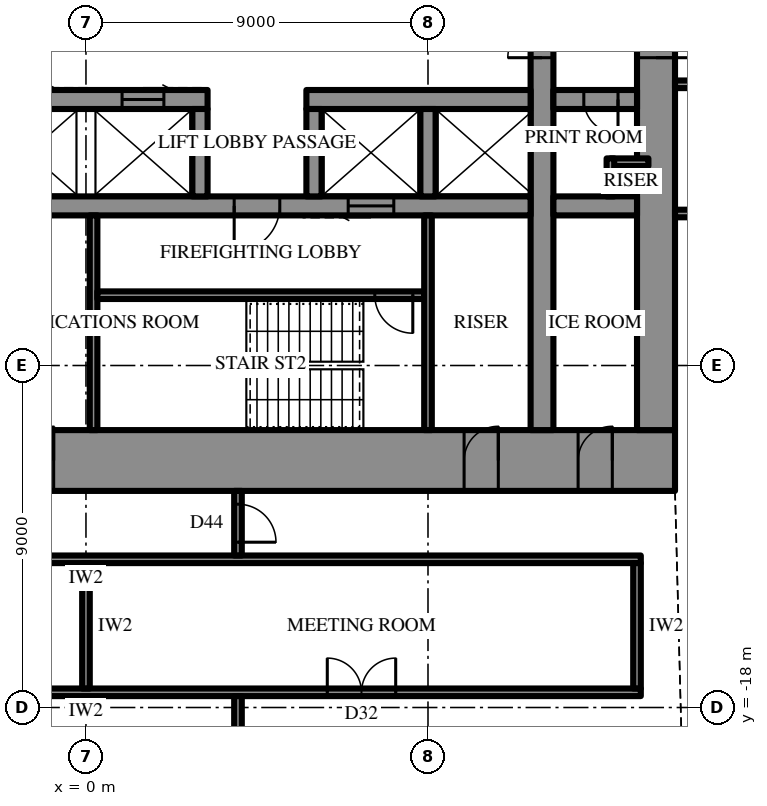
"""IFC4 building model, lengths in metres.
Left out: names, types, materials, properties, quantities, classifications, styles, units other than length and angle.
Written with IfcOpenShell. Run it as: python <this file> out.ifc"""

import sys

from ifc_helpers import new_model, si_unit, direction, frame, frame_2d, origin, place, context, subcontext, project, spatial, rectangle, extrude, element, fill, save


model = new_model("IFC4")
c1 = context("Model", 3, precision=1e-05, world=origin(), true_north=direction((0.0, 1.0)))
c2 = subcontext(c1, "Body", "Model", "MODEL_VIEW")
j1 = project(units=[si_unit("LENGTHUNIT", "METRE"), si_unit("PLANEANGLEUNIT", "RADIAN")], contexts=[c1])
p1 = place(None, origin())
s1 = spatial("IfcSite", under=j1, at=p1, CompositionType="ELEMENT")
p2 = place(p1, origin())
s2 = spatial("IfcBuilding", under=s1, at=p2, CompositionType="ELEMENT")
p3 = place(p2, frame((0.0, 0.0, 282.7)))
s3 = spatial("IfcBuildingStorey", under=s2, at=p3, CompositionType="ELEMENT", Elevation=282.7)
p4 = place(p3, frame((15.5, -11.5, 0.0), z_axis=(0.0, 0.0, 1.0), x_axis=(-1.0, 0.0, 0.0)))
e1 = element("IfcWall", 1, at=p4, inside=s3, PredefinedType="SHEAR", context=c2, shape_type="SweptSolid", body=[
    extrude(rectangle(XDim=31.0, YDim=1.6, at=frame_2d((15.5, 0.0))), origin(), (0.0, 0.0, 1.0), 4.2),
])
p5 = place(p4, frame((16.35, 0.0, 0.0)))
e2 = element("IfcOpeningElement", 2, at=p5, cuts=e1, PredefinedType="OPENING", context=c2, shape_type="SweptSolid", body=[
    extrude(rectangle(XDim=0.9, YDim=2.2, at=frame_2d((0.45, 1.1))), frame((0.0, 0.81, 0.0), z_axis=(0.0, -1.0, 0.0), x_axis=(1.0, 0.0, 0.0)), (0.0, 0.0, 1.0), 1.62),
])
p6 = place(p4, frame((19.35, 0.0, 0.0)))
e3 = element("IfcOpeningElement", 3, at=p6, cuts=e1, PredefinedType="OPENING", context=c2, shape_type="SweptSolid", body=[
    extrude(rectangle(XDim=0.9, YDim=2.2, at=frame_2d((0.45, 1.1))), frame((0.0, 0.81, 0.0), z_axis=(0.0, -1.0, 0.0), x_axis=(1.0, 0.0, 0.0)), (0.0, 0.0, 1.0), 1.62),
])
p7 = place(p4, frame((22.4, 0.0, 0.0)))
e4 = element("IfcOpeningElement", 4, at=p7, cuts=e1, PredefinedType="OPENING", context=c2, shape_type="SweptSolid", body=[
    extrude(rectangle(XDim=1.0, YDim=2.2, at=frame_2d((0.5, 1.1))), frame((0.0, 0.81, 0.0), z_axis=(0.0, -1.0, 0.0), x_axis=(1.0, 0.0, 0.0)), (0.0, 0.0, 1.0), 1.62),
])
p8 = place(p4, frame((1.65, 0.0, 0.0)))
e5 = element("IfcOpeningElement", 5, at=p8, cuts=e1, PredefinedType="OPENING", context=c2, shape_type="SweptSolid", body=[
    extrude(rectangle(XDim=0.9, YDim=2.2, at=frame_2d((0.45, 1.1))), frame((0.0, 0.81, 0.0), z_axis=(0.0, -1.0, 0.0), x_axis=(1.0, 0.0, 0.0)), (0.0, 0.0, 1.0), 1.62),
])
p9 = place(p4, frame((4.65, 0.0, 0.0)))
e6 = element("IfcOpeningElement", 6, at=p9, cuts=e1, PredefinedType="OPENING", context=c2, shape_type="SweptSolid", body=[
    extrude(rectangle(XDim=0.9, YDim=2.2, at=frame_2d((0.45, 1.1))), frame((0.0, 0.81, 0.0), z_axis=(0.0, -1.0, 0.0), x_axis=(1.0, 0.0, 0.0)), (0.0, 0.0, 1.0), 1.62),
])
p10 = place(p4, frame((25.45, 0.0, 0.0)))
e7 = element("IfcOpeningElement", 7, at=p10, cuts=e1, PredefinedType="OPENING", context=c2, shape_type="SweptSolid", body=[
    extrude(rectangle(XDim=0.9, YDim=2.2, at=frame_2d((0.45, 1.1))), frame((0.0, 0.81, 0.0), z_axis=(0.0, -1.0, 0.0), x_axis=(1.0, 0.0, 0.0)), (0.0, 0.0, 1.0), 1.62),
])
p11 = place(p4, frame((28.45, 0.0, 0.0)))
e8 = element("IfcOpeningElement", 8, at=p11, cuts=e1, PredefinedType="OPENING", context=c2, shape_type="SweptSolid", body=[
    extrude(rectangle(XDim=0.9, YDim=2.2, at=frame_2d((0.45, 1.1))), frame((0.0, 0.81, 0.0), z_axis=(0.0, -1.0, 0.0), x_axis=(1.0, 0.0, 0.0)), (0.0, 0.0, 1.0), 1.62),
])
p12 = place(p3, frame((15.0, -10.7, 0.0), z_axis=(0.0, 0.0, 1.0), x_axis=(0.0, 1.0, 0.0)))
e9 = element("IfcWall", 9, at=p12, inside=s3, PredefinedType="SHEAR", context=c2, shape_type="SweptSolid", body=[
    extrude(rectangle(XDim=21.4, YDim=1.0, at=frame_2d((10.7, 0.0))), origin(), (0.0, 0.0, 1.0), 4.2),
])
p13 = place(p12, frame((9.8, 0.0, 0.0)))
e10 = element("IfcOpeningElement", 10, at=p13, cuts=e9, PredefinedType="OPENING", context=c2, shape_type="SweptSolid", body=[
    extrude(rectangle(XDim=1.8, YDim=2.4, at=frame_2d((0.9, 1.2))), frame((0.0, 0.51, 0.0), z_axis=(0.0, -1.0, 0.0), x_axis=(1.0, 0.0, 0.0)), (0.0, 0.0, 1.0), 1.02),
])
p14 = place(p3, frame((12.0, -10.7, 0.0), z_axis=(0.0, 0.0, 1.0), x_axis=(0.0, 1.0, 0.0)))
e11 = element("IfcWall", 11, at=p14, inside=s3, PredefinedType="SHEAR", context=c2, shape_type="SweptSolid", body=[
    extrude(rectangle(XDim=21.4, YDim=0.6, at=frame_2d((10.7, 0.0))), origin(), (0.0, 0.0, 1.0), 4.2),
])
p15 = place(p14, frame((9.8, 0.0, 0.0)))
e12 = element("IfcOpeningElement", 12, at=p15, cuts=e11, PredefinedType="OPENING", context=c2, shape_type="SweptSolid", body=[
    extrude(rectangle(XDim=1.8, YDim=2.4, at=frame_2d((0.9, 1.2))), frame((0.0, 0.31, 0.0), z_axis=(0.0, -1.0, 0.0), x_axis=(1.0, 0.0, 0.0)), (0.0, 0.0, 1.0), 0.62),
])
p16 = place(p3, frame((14.5, -2.0, 0.0), z_axis=(0.0, 0.0, 1.0), x_axis=(-1.0, 0.0, 0.0)))
e13 = element("IfcWall", 13, at=p16, inside=s3, PredefinedType="SHEAR", context=c2, shape_type="SweptSolid", body=[
    extrude(rectangle(XDim=2.2, YDim=0.5, at=frame_2d((1.1, 0.0))), origin(), (0.0, 0.0, 1.0), 4.2),
])
p17 = place(p16, frame((0.5, 0.0, 0.0)))
e14 = element("IfcOpeningElement", 14, at=p17, cuts=e13, PredefinedType="OPENING", context=c2, shape_type="SweptSolid", body=[
    extrude(rectangle(XDim=0.9, YDim=2.2, at=frame_2d((0.45, 1.1))), frame((0.0, 0.26, 0.0), z_axis=(0.0, -1.0, 0.0), x_axis=(1.0, 0.0, 0.0)), (0.0, 0.0, 1.0), 0.52),
])
p18 = place(p3, frame((11.7, -2.0, 0.0), z_axis=(0.0, 0.0, 1.0), x_axis=(-1.0, 0.0, 0.0)))
e15 = element("IfcWall", 15, at=p18, inside=s3, PredefinedType="SHEAR", context=c2, shape_type="SweptSolid", body=[
    extrude(rectangle(XDim=5.9, YDim=0.5, at=frame_2d((2.95, 0.0))), origin(), (0.0, 0.0, 1.0), 4.2),
])
p19 = place(p3, frame((3.2, -2.0, 0.0), z_axis=(0.0, 0.0, 1.0), x_axis=(-1.0, 0.0, 0.0)))
e16 = element("IfcWall", 16, at=p19, inside=s3, PredefinedType="SHEAR", context=c2, shape_type="SweptSolid", body=[
    extrude(rectangle(XDim=14.9, YDim=0.5, at=frame_2d((7.45, 0.0))), origin(), (0.0, 0.0, 1.0), 4.2),
])
p20 = place(p19, frame((1.15, 0.0, 0.0)))
e17 = element("IfcOpeningElement", 17, at=p20, cuts=e16, PredefinedType="OPENING", context=c2, shape_type="SweptSolid", body=[
    extrude(rectangle(XDim=1.1, YDim=2.2, at=frame_2d((0.55, 1.1))), frame((0.0, 0.26, 0.0), z_axis=(0.0, -1.0, 0.0), x_axis=(1.0, 0.0, 0.0)), (0.0, 0.0, 1.0), 0.52),
])
p21 = place(p19, frame((4.15, 0.0, 0.0)))
e18 = element("IfcOpeningElement", 18, at=p21, cuts=e16, PredefinedType="OPENING", context=c2, shape_type="SweptSolid", body=[
    extrude(rectangle(XDim=1.1, YDim=2.2, at=frame_2d((0.55, 1.1))), frame((0.0, 0.26, 0.0), z_axis=(0.0, -1.0, 0.0), x_axis=(1.0, 0.0, 0.0)), (0.0, 0.0, 1.0), 0.52),
])
p22 = place(p19, frame((7.15, 0.0, 0.0)))
e19 = element("IfcOpeningElement", 19, at=p22, cuts=e16, PredefinedType="OPENING", context=c2, shape_type="SweptSolid", body=[
    extrude(rectangle(XDim=1.1, YDim=2.2, at=frame_2d((0.55, 1.1))), frame((0.0, 0.26, 0.0), z_axis=(0.0, -1.0, 0.0), x_axis=(1.0, 0.0, 0.0)), (0.0, 0.0, 1.0), 0.52),
])
p23 = place(p19, frame((10.15, 0.0, 0.0)))
e20 = element("IfcOpeningElement", 20, at=p23, cuts=e16, PredefinedType="OPENING", context=c2, shape_type="SweptSolid", body=[
    extrude(rectangle(XDim=1.1, YDim=2.2, at=frame_2d((0.55, 1.1))), frame((0.0, 0.26, 0.0), z_axis=(0.0, -1.0, 0.0), x_axis=(1.0, 0.0, 0.0)), (0.0, 0.0, 1.0), 0.52),
])
p24 = place(p3, frame((14.5, -4.8, 0.0), z_axis=(0.0, 0.0, 1.0), x_axis=(-1.0, 0.0, 0.0)))
e21 = element("IfcWall", 21, at=p24, inside=s3, PredefinedType="SHEAR", context=c2, shape_type="SweptSolid", body=[
    extrude(rectangle(XDim=2.2, YDim=0.5, at=frame_2d((1.1, 0.0))), origin(), (0.0, 0.0, 1.0), 4.2),
])
p25 = place(p3, frame((11.7, -4.8, 0.0), z_axis=(0.0, 0.0, 1.0), x_axis=(-1.0, 0.0, 0.0)))
e22 = element("IfcWall", 22, at=p25, inside=s3, PredefinedType="SHEAR", context=c2, shape_type="SweptSolid", body=[
    extrude(rectangle(XDim=23.4, YDim=0.5, at=frame_2d((11.7, 0.0))), origin(), (0.0, 0.0, 1.0), 4.2),
])
p26 = place(p25, frame((6.6, 0.0, 0.0)))
e23 = element("IfcOpeningElement", 23, at=p26, cuts=e22, PredefinedType="OPENING", context=c2, shape_type="SweptSolid", body=[
    extrude(rectangle(XDim=1.2, YDim=2.2, at=frame_2d((0.6, 1.1))), frame((0.0, 0.26, 0.0), z_axis=(0.0, -1.0, 0.0), x_axis=(1.0, 0.0, 0.0)), (0.0, 0.0, 1.0), 0.52),
])
p27 = place(p25, frame((3.6, 0.0, 0.0)))
e24 = element("IfcOpeningElement", 24, at=p27, cuts=e22, PredefinedType="OPENING", context=c2, shape_type="SweptSolid", body=[
    extrude(rectangle(XDim=1.2, YDim=2.2, at=frame_2d((0.6, 1.1))), frame((0.0, 0.26, 0.0), z_axis=(0.0, -1.0, 0.0), x_axis=(1.0, 0.0, 0.0)), (0.0, 0.0, 1.0), 0.52),
])
for number, where, z_axis, x_axis in (
    (25, (9.0, -2.25, 0.0), (0.0, 0.0, 1.0), (0.0, -1.0, 0.0)),
    (26, (6.0, -2.25, 0.0), (0.0, 0.0, 1.0), (0.0, -1.0, 0.0)),
    (27, (3.0, -2.25, 0.0), (0.0, 0.0, 1.0), (0.0, -1.0, 0.0)),
):
    element("IfcWall", number, at=place(p3, frame(where, z_axis=z_axis, x_axis=x_axis)), inside=s3, PredefinedType="SHEAR", context=c2, shape_type="SweptSolid", body=[
        extrude(rectangle(XDim=2.3, YDim=0.4, at=frame_2d((1.15, 0.0))), origin(), (0.0, 0.0, 1.0), 4.2),
    ])
p28 = place(p3, frame((0.2, -5.05, 0.0), z_axis=(0.0, 0.0, 1.0), x_axis=(0.0, -1.0, 0.0)))
e28 = element("IfcWall", 28, at=p28, inside=s3, PredefinedType="SHEAR", context=c2, shape_type="SweptSolid", body=[
    extrude(rectangle(XDim=5.65, YDim=0.2, at=frame_2d((2.825, 0.0))), origin(), (0.0, 0.0, 1.0), 4.2),
])
p29 = place(p3, frame((8.9, -7.15, 0.0), z_axis=(0.0, 0.0, 1.0), x_axis=(-1.0, 0.0, 0.0)))
e29 = element("IfcWall", 29, at=p29, inside=s3, PredefinedType="SHEAR", context=c2, shape_type="SweptSolid", body=[
    extrude(rectangle(XDim=8.6, YDim=0.2, at=frame_2d((4.3, 0.0))), origin(), (0.0, 0.0, 1.0), 4.2),
])
p30 = place(p29, frame((0.3, 0.0, 0.0)))
e30 = element("IfcOpeningElement", 30, at=p30, cuts=e29, PredefinedType="OPENING", context=c2, shape_type="SweptSolid", body=[
    extrude(rectangle(XDim=1.0, YDim=2.2, at=frame_2d((0.5, 1.1))), frame((0.0, 0.11, 0.0), z_axis=(0.0, -1.0, 0.0), x_axis=(1.0, 0.0, 0.0)), (0.0, 0.0, 1.0), 0.22),
])
p31 = place(p3, frame((9.0, -5.05, 0.0), z_axis=(0.0, 0.0, 1.0), x_axis=(0.0, -1.0, 0.0)))
e31 = element("IfcWall", 31, at=p31, inside=s3, PredefinedType="PARTITIONING", context=c2, shape_type="SweptSolid", body=[
    extrude(rectangle(XDim=5.65, YDim=0.2, at=frame_2d((2.825, 0.0))), origin(), (0.0, 0.0, 1.0), 4.0),
])
for number, where, z_axis, x_axis in (
    (32, (14.8, -3.65, 0.0), (0.0, 0.0, 1.0), (-1.0, 0.0, 0.0)),
    (33, (13.8, -3.55, 0.0), (0.0, 0.0, 1.0), (0.0, -1.0, 0.0)),
):
    element("IfcWall", number, at=place(p3, frame(where, z_axis=z_axis, x_axis=x_axis)), inside=s3, PredefinedType="PARTITIONING", context=c2, shape_type="SweptSolid", body=[
        extrude(rectangle(XDim=1.0, YDim=0.2, at=frame_2d((0.5, 0.0))), origin(), (0.0, 0.0, 1.0), 4.0),
    ])
p32 = place(p3, frame((14.6, -14.1, 0.0), z_axis=(0.0, 0.0, 1.0), x_axis=(-1.0, 0.0, 0.0)))
e34 = element("IfcWall", 34, at=p32, inside=s3, PredefinedType="PARTITIONING", context=c2, shape_type="SweptSolid", body=[
    extrude(rectangle(XDim=29.2, YDim=0.2, at=frame_2d((14.6, 0.0))), origin(), (0.0, 0.0, 1.0), 4.0),
])
p33 = place(p3, frame((14.6, -17.6, 0.0), z_axis=(0.0, 0.0, 1.0), x_axis=(-1.0, 0.0, 0.0)))
e35 = element("IfcWall", 35, at=p33, inside=s3, PredefinedType="PARTITIONING", context=c2, shape_type="SweptSolid", body=[
    extrude(rectangle(XDim=29.2, YDim=0.2, at=frame_2d((14.6, 0.0))), origin(), (0.0, 0.0, 1.0), 4.0),
])
p34 = place(p33, frame((6.45, 0.0, 0.0)))
e36 = element("IfcOpeningElement", 36, at=p34, cuts=e35, PredefinedType="OPENING", context=c2, shape_type="SweptSolid", body=[
    extrude(rectangle(XDim=1.8, YDim=2.4, at=frame_2d((0.9, 1.2))), frame((0.0, 0.11, 0.0), z_axis=(0.0, -1.0, 0.0), x_axis=(1.0, 0.0, 0.0)), (0.0, 0.0, 1.0), 0.22),
])
p35 = place(p33, frame((20.95, 0.0, 0.0)))
e37 = element("IfcOpeningElement", 37, at=p35, cuts=e35, PredefinedType="OPENING", context=c2, shape_type="SweptSolid", body=[
    extrude(rectangle(XDim=1.8, YDim=2.4, at=frame_2d((0.9, 1.2))), frame((0.0, 0.11, 0.0), z_axis=(0.0, -1.0, 0.0), x_axis=(1.0, 0.0, 0.0)), (0.0, 0.0, 1.0), 0.22),
])
p36 = place(p3, frame((14.5, -14.2, 0.0), z_axis=(0.0, 0.0, 1.0), x_axis=(0.0, -1.0, 0.0)))
e38 = element("IfcWall", 38, at=p36, inside=s3, PredefinedType="PARTITIONING", context=c2, shape_type="SweptSolid", body=[
    extrude(rectangle(XDim=3.3, YDim=0.2, at=frame_2d((1.65, 0.0))), origin(), (0.0, 0.0, 1.0), 4.0),
])
p37 = place(p3, frame((0.0, -14.2, 0.0), z_axis=(0.0, 0.0, 1.0), x_axis=(0.0, -1.0, 0.0)))
e39 = element("IfcWall", 39, at=p37, inside=s3, PredefinedType="PARTITIONING", context=c2, shape_type="SweptSolid", body=[
    extrude(rectangle(XDim=3.3, YDim=0.2, at=frame_2d((1.65, 0.0))), origin(), (0.0, 0.0, 1.0), 2.992),
])
p38 = place(p3, frame((15.683, -19.837, 0.0), z_axis=(0.0, 0.0, 1.0), x_axis=(0.499989672313, 0.866031366395, 0.0)))
e40 = element("IfcWall", 40, at=p38, inside=s3, PredefinedType="PARTITIONING", context=c2, shape_type="SweptSolid", body=[
    extrude(rectangle(XDim=9.438, YDim=0.2, at=frame_2d((4.719, 0.0))), origin(), (0.0, 0.0, 1.0), 4.0),
])
p39 = place(p38, frame((3.819, 0.0, 0.0)))
e41 = element("IfcOpeningElement", 41, at=p39, cuts=e40, PredefinedType="OPENING", context=c2, shape_type="SweptSolid", body=[
    extrude(rectangle(XDim=1.8, YDim=2.4, at=frame_2d((0.9, 1.2))), frame((0.0, 0.11, 0.0), z_axis=(0.0, -1.0, 0.0), x_axis=(1.0, 0.0, 0.0)), (0.0, 0.0, 1.0), 0.22),
])
p40 = place(p3, frame((15.5, -1.6, 0.0), z_axis=(0.0, 0.0, 1.0), x_axis=(1.0, 0.0, 0.0)))
e42 = element("IfcWall", 42, at=p40, inside=s3, PredefinedType="PARTITIONING", context=c2, shape_type="SweptSolid", body=[
    extrude(rectangle(XDim=11.7, YDim=0.2, at=frame_2d((5.85, 0.0))), origin(), (0.0, 0.0, 1.0), 4.0),
])
p41 = place(p40, frame((5.35, 0.0, 0.0)))
e43 = element("IfcOpeningElement", 43, at=p41, cuts=e42, PredefinedType="OPENING", context=c2, shape_type="SweptSolid", body=[
    extrude(rectangle(XDim=1.0, YDim=2.2, at=frame_2d((0.5, 1.1))), frame((0.0, 0.11, 0.0), z_axis=(0.0, -1.0, 0.0), x_axis=(1.0, 0.0, 0.0)), (0.0, 0.0, 1.0), 0.22),
])
p42 = place(p3, frame((4.0, -12.3, 0.0), z_axis=(0.0, 0.0, 1.0), x_axis=(0.0, -1.0, 0.0)))
e44 = element("IfcWall", 44, at=p42, inside=s3, PredefinedType="PARTITIONING", context=c2, shape_type="SweptSolid", body=[
    extrude(rectangle(XDim=1.7, YDim=0.2, at=frame_2d((0.85, 0.0))), origin(), (0.0, 0.0, 1.0), 4.0),
])
p43 = place(p42, frame((0.35, 0.0, 0.0)))
e45 = element("IfcOpeningElement", 45, at=p43, cuts=e44, PredefinedType="OPENING", context=c2, shape_type="SweptSolid", body=[
    extrude(rectangle(XDim=1.0, YDim=2.2, at=frame_2d((0.5, 1.1))), frame((0.0, 0.11, 0.0), z_axis=(0.0, -1.0, 0.0), x_axis=(1.0, 0.0, 0.0)), (0.0, 0.0, 1.0), 0.22),
])
p44 = place(p3, frame((4.0, -17.7, 0.0), z_axis=(0.0, 0.0, 1.0), x_axis=(0.0, -1.0, 0.0)))
e46 = element("IfcWall", 46, at=p44, inside=s3, PredefinedType="PARTITIONING", context=c2, shape_type="SweptSolid", body=[
    extrude(rectangle(XDim=11.1, YDim=0.2, at=frame_2d((5.55, 0.0))), origin(), (0.0, 0.0, 1.0), 4.0),
])
p45 = place(p3, frame((15.5, -5.0, 0.0), z_axis=(0.0, 0.0, 1.0), x_axis=(1.0, 0.0, 0.0)))
e47 = element("IfcWall", 47, at=p45, inside=s3, PredefinedType="PARTITIONING", context=c2, shape_type="SweptSolid", body=[
    extrude(rectangle(XDim=14.845, YDim=0.2, at=frame_2d((7.423, 0.0))), origin(), (0.0, 0.0, 1.0), 4.0),
])
p46 = place(p45, frame((0.985, 0.0, 0.0)))
e48 = element("IfcOpeningElement", 48, at=p46, cuts=e47, PredefinedType="OPENING", context=c2, shape_type="SweptSolid", body=[
    extrude(rectangle(XDim=1.0, YDim=2.2, at=frame_2d((0.5, 1.1))), frame((0.0, 0.11, 0.0), z_axis=(0.0, -1.0, 0.0), x_axis=(1.0, 0.0, 0.0)), (0.0, 0.0, 1.0), 0.22),
])
p47 = place(p13, frame((1.8, 0.0, 0.0), z_axis=(0.0, 0.0, 1.0), x_axis=(-1.0, 0.0, 0.0)))
e49 = element("IfcDoor", 49, at=p47, inside=s3, OperationType="DOUBLE_DOOR_SINGLE_SWING", PredefinedType="DOOR", context=c2, shape_type="SweptSolid", body=[
    extrude(rectangle(XDim=1.8, YDim=2.4, at=frame_2d((0.9, 1.2))), frame((0.0, 0.025, 0.0), z_axis=(0.0, -1.0, 0.0), x_axis=(1.0, 0.0, 0.0)), (0.0, 0.0, 1.0), 0.05),
])
fill(e10, e49)
p48 = place(p26, origin())
e50 = element("IfcDoor", 50, at=p48, inside=s3, OperationType="SINGLE_SWING_LEFT", PredefinedType="DOOR", context=c2, shape_type="SweptSolid", body=[
    extrude(rectangle(XDim=1.2, YDim=2.2, at=frame_2d((0.6, 1.1))), frame((0.0, 0.025, 0.0), z_axis=(0.0, -1.0, 0.0), x_axis=(1.0, 0.0, 0.0)), (0.0, 0.0, 1.0), 0.05),
])
fill(e23, e50)
p49 = place(p30, origin())
e51 = element("IfcDoor", 51, at=p49, inside=s3, OperationType="SINGLE_SWING_RIGHT", PredefinedType="DOOR", context=c2, shape_type="SweptSolid", body=[
    extrude(rectangle(XDim=1.0, YDim=2.2, at=frame_2d((0.5, 1.1))), frame((0.0, 0.025, 0.0), z_axis=(0.0, -1.0, 0.0), x_axis=(1.0, 0.0, 0.0)), (0.0, 0.0, 1.0), 0.05),
])
fill(e30, e51)
p50 = place(p5, frame((0.9, 0.0, 0.0), z_axis=(0.0, 0.0, 1.0), x_axis=(-1.0, 0.0, 0.0)))
e52 = element("IfcDoor", 52, at=p50, inside=s3, OperationType="SINGLE_SWING_LEFT", PredefinedType="DOOR", context=c2, shape_type="SweptSolid", body=[
    extrude(rectangle(XDim=0.9, YDim=2.2, at=frame_2d((0.45, 1.1))), frame((0.0, 0.025, 0.0), z_axis=(0.0, -1.0, 0.0), x_axis=(1.0, 0.0, 0.0)), (0.0, 0.0, 1.0), 0.05),
])
fill(e2, e52)
p51 = place(p8, frame((0.9, 0.0, 0.0), z_axis=(0.0, 0.0, 1.0), x_axis=(-1.0, 0.0, 0.0)))
e53 = element("IfcDoor", 53, at=p51, inside=s3, OperationType="SINGLE_SWING_LEFT", PredefinedType="DOOR", context=c2, shape_type="SweptSolid", body=[
    extrude(rectangle(XDim=0.9, YDim=2.2, at=frame_2d((0.45, 1.1))), frame((0.0, 0.025, 0.0), z_axis=(0.0, -1.0, 0.0), x_axis=(1.0, 0.0, 0.0)), (0.0, 0.0, 1.0), 0.05),
])
fill(e5, e53)
p52 = place(p9, frame((0.9, 0.0, 0.0), z_axis=(0.0, 0.0, 1.0), x_axis=(-1.0, 0.0, 0.0)))
e54 = element("IfcDoor", 54, at=p52, inside=s3, OperationType="SINGLE_SWING_LEFT", PredefinedType="DOOR", context=c2, shape_type="SweptSolid", body=[
    extrude(rectangle(XDim=0.9, YDim=2.2, at=frame_2d((0.45, 1.1))), frame((0.0, 0.025, 0.0), z_axis=(0.0, -1.0, 0.0), x_axis=(1.0, 0.0, 0.0)), (0.0, 0.0, 1.0), 0.05),
])
fill(e6, e54)
p53 = place(p17, origin())
e55 = element("IfcDoor", 55, at=p53, inside=s3, OperationType="SINGLE_SWING_RIGHT", PredefinedType="DOOR", context=c2, shape_type="SweptSolid", body=[
    extrude(rectangle(XDim=0.9, YDim=2.2, at=frame_2d((0.45, 1.1))), frame((0.0, 0.025, 0.0), z_axis=(0.0, -1.0, 0.0), x_axis=(1.0, 0.0, 0.0)), (0.0, 0.0, 1.0), 0.05),
])
fill(e14, e55)
p54 = place(p15, origin())
e56 = element("IfcDoor", 56, at=p54, inside=s3, OperationType="DOUBLE_DOOR_SINGLE_SWING", PredefinedType="DOOR", context=c2, shape_type="SweptSolid", body=[
    extrude(rectangle(XDim=1.8, YDim=2.4, at=frame_2d((0.9, 1.2))), frame((0.0, 0.025, 0.0), z_axis=(0.0, -1.0, 0.0), x_axis=(1.0, 0.0, 0.0)), (0.0, 0.0, 1.0), 0.05),
])
fill(e12, e56)
p55 = place(p27, origin())
e57 = element("IfcDoor", 57, at=p55, inside=s3, OperationType="SLIDING_TO_LEFT", PredefinedType="DOOR", context=c2, shape_type="SweptSolid", body=[
    extrude(rectangle(XDim=1.2, YDim=2.2, at=frame_2d((0.6, 1.1))), frame((0.0, 0.025, 0.0), z_axis=(0.0, -1.0, 0.0), x_axis=(1.0, 0.0, 0.0)), (0.0, 0.0, 1.0), 0.05),
])
fill(e24, e57)
p56 = place(p20, frame((1.1, 0.0, 0.0), z_axis=(0.0, 0.0, 1.0), x_axis=(-1.0, 0.0, 0.0)))
e58 = element("IfcDoor", 58, at=p56, inside=s3, OperationType="SLIDING_TO_LEFT", PredefinedType="DOOR", context=c2, shape_type="SweptSolid", body=[
    extrude(rectangle(XDim=1.1, YDim=2.2, at=frame_2d((0.55, 1.1))), frame((0.0, 0.025, 0.0), z_axis=(0.0, -1.0, 0.0), x_axis=(1.0, 0.0, 0.0)), (0.0, 0.0, 1.0), 0.05),
])
fill(e17, e58)
p57 = place(p34, frame((1.8, 0.0, 0.0), z_axis=(0.0, 0.0, 1.0), x_axis=(-1.0, 0.0, 0.0)))
e59 = element("IfcDoor", 59, at=p57, inside=s3, OperationType="DOUBLE_DOOR_SINGLE_SWING", PredefinedType="DOOR", context=c2, shape_type="SweptSolid", body=[
    extrude(rectangle(XDim=1.8, YDim=2.4, at=frame_2d((0.9, 1.2))), frame((0.0, 0.025, 0.0), z_axis=(0.0, -1.0, 0.0), x_axis=(1.0, 0.0, 0.0)), (0.0, 0.0, 1.0), 0.05),
])
fill(e36, e59)
p58 = place(p43, origin())
e60 = element("IfcDoor", 60, at=p58, inside=s3, OperationType="SINGLE_SWING_LEFT", PredefinedType="DOOR", context=c2, shape_type="SweptSolid", body=[
    extrude(rectangle(XDim=1.0, YDim=2.2, at=frame_2d((0.5, 1.1))), frame((0.0, 0.025, 0.0), z_axis=(0.0, -1.0, 0.0), x_axis=(1.0, 0.0, 0.0)), (0.0, 0.0, 1.0), 0.05),
])
fill(e45, e60)
save(model, sys.argv[1])
